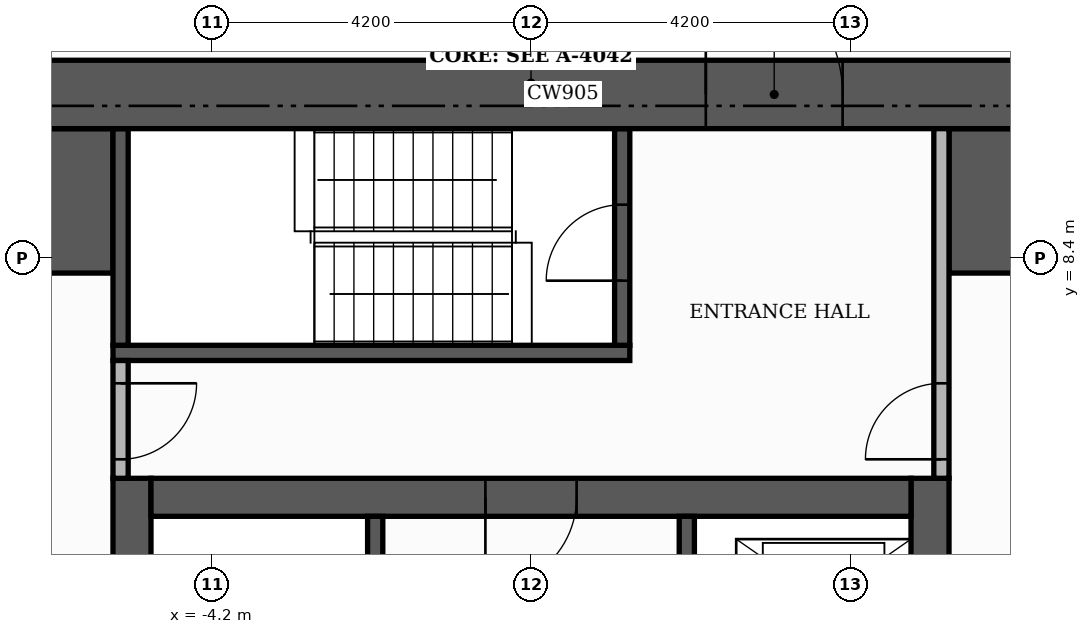
"""IFC4 building model, lengths in metres.
Left out: names, types, materials, properties, quantities, classifications, styles, units other than length and angle.
Written with IfcOpenShell. Run it as: python <this file> out.ifc"""

import sys

from ifc_helpers import new_model, si_unit, direction, frame, frame_2d, origin, place, context, subcontext, project, spatial, rectangle, extrude, element, fill, save


model = new_model("IFC4")
c1 = context("Model", 3, precision=1e-05, world=origin(), true_north=direction((0.0, 1.0)))
c2 = subcontext(c1, "Body", "Model", "MODEL_VIEW")
j1 = project(units=[si_unit("LENGTHUNIT", "METRE"), si_unit("PLANEANGLEUNIT", "RADIAN")], contexts=[c1])
p1 = place(None, origin())
s1 = spatial("IfcSite", under=j1, at=p1, CompositionType="ELEMENT")
p2 = place(p1, origin())
s2 = spatial("IfcBuilding", under=s1, at=p2, CompositionType="ELEMENT")
p3 = place(p2, frame((0.0, 0.0, 256.2)))
s3 = spatial("IfcBuildingStorey", under=s2, at=p3, CompositionType="ELEMENT", Elevation=256.2)
for number, where, z_axis, x_axis in (
    (1, (-5.25, -5.0, 0.0), (0.0, 0.0, 1.0), (0.0, 1.0, 0.0)),
    (2, (5.25, -5.0, 0.0), (0.0, 0.0, 1.0), (0.0, 1.0, 0.0)),
):
    element("IfcWall", number, at=place(p3, frame(where, z_axis=z_axis, x_axis=x_axis)), inside=s3, PredefinedType="SHEAR", context=c2, shape_type="SweptSolid", body=[
        extrude(rectangle(XDim=10.5, YDim=0.5, at=frame_2d((5.25, 0.0))), origin(), (0.0, 0.0, 1.0), 3.48),
    ])
p4 = place(p3, frame((-5.0, 5.25, 0.0), z_axis=(0.0, 0.0, 1.0), x_axis=(1.0, 0.0, 0.0)))
e3 = element("IfcWall", 3, at=p4, inside=s3, PredefinedType="SHEAR", context=c2, shape_type="SweptSolid", body=[
    extrude(rectangle(XDim=10.0, YDim=0.5, at=frame_2d((5.0, 0.0))), origin(), (0.0, 0.0, 1.0), 3.48),
])
p5 = place(p4, frame((4.4, 0.0, 0.0)))
e4 = element("IfcOpeningElement", 4, at=p5, cuts=e3, PredefinedType="OPENING", context=c2, shape_type="SweptSolid", body=[
    extrude(rectangle(XDim=1.2, YDim=2.1, at=frame_2d((0.6, 1.05))), frame((0.0, 0.26, 0.0), z_axis=(0.0, -1.0, 0.0), x_axis=(1.0, 0.0, 0.0)), (0.0, 0.0, 1.0), 0.52),
])
for number, where, z_axis, x_axis in (
    (5, (-10.1, 9.15, 0.0), (0.0, 0.0, 1.0), (1.0, 0.0, 0.0)),
    (6, (5.5, 9.15, 0.0), (0.0, 0.0, 1.0), (1.0, 0.0, 0.0)),
):
    element("IfcWall", number, at=place(p3, frame(where, z_axis=z_axis, x_axis=x_axis)), inside=s3, PredefinedType="SHEAR", context=c2, shape_type="SweptSolid", body=[
        extrude(rectangle(XDim=4.6, YDim=1.9, at=frame_2d((2.3, 0.0))), origin(), (0.0, 0.0, 1.0), 3.48),
    ])
p6 = place(p3, frame((-2.05, -1.4, 0.0), z_axis=(0.0, 0.0, 1.0), x_axis=(0.0, 1.0, 0.0)))
e7 = element("IfcWall", 7, at=p6, inside=s3, PredefinedType="SHEAR", context=c2, shape_type="SweptSolid", body=[
    extrude(rectangle(XDim=6.4, YDim=0.2, at=frame_2d((3.2, 0.0))), origin(), (0.0, 0.0, 1.0), 3.48),
])
p7 = place(p6, frame((0.15, 0.0, 0.0)))
e8 = element("IfcOpeningElement", 8, at=p7, cuts=e7, PredefinedType="OPENING", context=c2, shape_type="SweptSolid", body=[
    extrude(rectangle(XDim=1.0, YDim=2.1, at=frame_2d((0.5, 1.05))), frame((0.0, 0.11, 0.0), z_axis=(0.0, -1.0, 0.0), x_axis=(1.0, 0.0, 0.0)), (0.0, 0.0, 1.0), 0.22),
])
p8 = place(p3, frame((-5.5, 7.15, 0.0), z_axis=(0.0, 0.0, 1.0), x_axis=(1.0, 0.0, 0.0)))
e9 = element("IfcWall", 9, at=p8, inside=s3, PredefinedType="SHEAR", context=c2, shape_type="SweptSolid", body=[
    extrude(rectangle(XDim=6.8, YDim=0.2, at=frame_2d((3.4, 0.0))), origin(), (0.0, 0.0, 1.0), 3.48),
])
p9 = place(p3, frame((-5.4, 7.25, 0.0), z_axis=(0.0, 0.0, 1.0), x_axis=(0.0, 1.0, 0.0)))
e10 = element("IfcWall", 10, at=p9, inside=s3, PredefinedType="SHEAR", context=c2, shape_type="SweptSolid", body=[
    extrude(rectangle(XDim=2.85, YDim=0.2, at=frame_2d((1.425, 0.0))), origin(), (0.0, 0.0, 1.0), 3.48),
])
p10 = place(p3, frame((1.2, 7.25, 0.0), z_axis=(0.0, 0.0, 1.0), x_axis=(0.0, 1.0, 0.0)))
e11 = element("IfcWall", 11, at=p10, inside=s3, PredefinedType="SHEAR", context=c2, shape_type="SweptSolid", body=[
    extrude(rectangle(XDim=2.85, YDim=0.2, at=frame_2d((1.425, 0.0))), origin(), (0.0, 0.0, 1.0), 3.48),
])
p11 = place(p10, frame((0.85, 0.0, 0.0)))
e12 = element("IfcOpeningElement", 12, at=p11, cuts=e11, PredefinedType="OPENING", context=c2, shape_type="SweptSolid", body=[
    extrude(rectangle(XDim=1.0, YDim=2.1, at=frame_2d((0.5, 1.05))), frame((0.0, 0.11, 0.0), z_axis=(0.0, -1.0, 0.0), x_axis=(1.0, 0.0, 0.0)), (0.0, 0.0, 1.0), 0.22),
])
p12 = place(p3, frame((2.05, 1.6, 0.0), z_axis=(0.0, 0.0, 1.0), x_axis=(0.0, 1.0, 0.0)))
e13 = element("IfcWall", 13, at=p12, inside=s3, PredefinedType="SHEAR", context=c2, shape_type="SweptSolid", body=[
    extrude(rectangle(XDim=3.4, YDim=0.2, at=frame_2d((1.7, 0.0))), origin(), (0.0, 0.0, 1.0), 3.48),
])
p13 = place(p12, frame((1.75, 0.0, 0.0)))
e14 = element("IfcOpeningElement", 14, at=p13, cuts=e13, PredefinedType="OPENING", context=c2, shape_type="SweptSolid", body=[
    extrude(rectangle(XDim=1.1, YDim=2.1, at=frame_2d((0.55, 1.05))), frame((0.0, 0.11, 0.0), z_axis=(0.0, -1.0, 0.0), x_axis=(1.0, 0.0, 0.0)), (0.0, 0.0, 1.0), 0.22),
])
p14 = place(p12, frame((0.15, 0.0, 0.0)))
e15 = element("IfcOpeningElement", 15, at=p14, cuts=e13, PredefinedType="OPENING", context=c2, shape_type="SweptSolid", body=[
    extrude(rectangle(XDim=0.8, YDim=2.1, at=frame_2d((0.4, 1.05))), frame((0.0, 0.11, 0.0), z_axis=(0.0, -1.0, 0.0), x_axis=(1.0, 0.0, 0.0)), (0.0, 0.0, 1.0), 0.22),
])
p15 = place(p3, frame((-11.0, 10.55, 0.0), z_axis=(0.0, 0.0, 1.0), x_axis=(1.0, 0.0, 0.0)))
e16 = element("IfcWall", 16, at=p15, inside=s3, PredefinedType="SHEAR", context=c2, shape_type="SweptSolid", body=[
    extrude(rectangle(XDim=22.0, YDim=0.9, at=frame_2d((11.0, 0.0))), origin(), (0.0, 0.0, 1.0), 3.48),
])
p16 = place(p15, frame((13.3, 0.0, 0.0)))
e17 = element("IfcOpeningElement", 17, at=p16, cuts=e16, PredefinedType="OPENING", context=c2, shape_type="SweptSolid", body=[
    extrude(rectangle(XDim=1.8, YDim=2.2, at=frame_2d((0.9, 1.1))), frame((0.0, 0.46, 0.0), z_axis=(0.0, -1.0, 0.0), x_axis=(1.0, 0.0, 0.0)), (0.0, 0.0, 1.0), 0.92),
])
p17 = place(p3, frame((-5.4, 5.5, 0.0), z_axis=(0.0, 0.0, 1.0), x_axis=(0.0, 1.0, 0.0)))
e18 = element("IfcWall", 18, at=p17, inside=s3, PredefinedType="PARTITIONING", context=c2, shape_type="SweptSolid", body=[
    extrude(rectangle(XDim=1.55, YDim=0.2, at=frame_2d((0.775, 0.0))), origin(), (0.0, 0.0, 1.0), 3.48),
])
p18 = place(p17, frame((0.25, 0.0, 0.0)))
e19 = element("IfcOpeningElement", 19, at=p18, cuts=e18, PredefinedType="OPENING", context=c2, shape_type="SweptSolid", body=[
    extrude(rectangle(XDim=1.0, YDim=2.1, at=frame_2d((0.5, 1.05))), frame((0.0, 0.11, 0.0), z_axis=(0.0, -1.0, 0.0), x_axis=(1.0, 0.0, 0.0)), (0.0, 0.0, 1.0), 0.22),
])
p19 = place(p3, frame((5.4, 5.5, 0.0), z_axis=(0.0, 0.0, 1.0), x_axis=(0.0, 1.0, 0.0)))
e20 = element("IfcWall", 20, at=p19, inside=s3, PredefinedType="PARTITIONING", context=c2, shape_type="SweptSolid", body=[
    extrude(rectangle(XDim=4.6, YDim=0.2, at=frame_2d((2.3, 0.0))), origin(), (0.0, 0.0, 1.0), 3.48),
])
p20 = place(p19, frame((0.25, 0.0, 0.0)))
e21 = element("IfcOpeningElement", 21, at=p20, cuts=e20, PredefinedType="OPENING", context=c2, shape_type="SweptSolid", body=[
    extrude(rectangle(XDim=1.0, YDim=2.1, at=frame_2d((0.5, 1.05))), frame((0.0, 0.11, 0.0), z_axis=(0.0, -1.0, 0.0), x_axis=(1.0, 0.0, 0.0)), (0.0, 0.0, 1.0), 0.22),
])
p21 = place(p5, frame((1.2, 0.0, 0.0), z_axis=(0.0, 0.0, 1.0), x_axis=(-1.0, 0.0, 0.0)))
e22 = element("IfcDoor", 22, at=p21, inside=s3, OperationType="SINGLE_SWING_LEFT", PredefinedType="DOOR", context=c2, shape_type="SweptSolid", body=[
    extrude(rectangle(XDim=1.2, YDim=2.1, at=frame_2d((0.6, 1.05))), frame((0.0, 0.025, 0.0), z_axis=(0.0, -1.0, 0.0), x_axis=(1.0, 0.0, 0.0)), (0.0, 0.0, 1.0), 0.05),
])
fill(e4, e22)
p22 = place(p11, origin())
e23 = element("IfcDoor", 23, at=p22, inside=s3, OperationType="SINGLE_SWING_LEFT", PredefinedType="DOOR", context=c2, shape_type="SweptSolid", body=[
    extrude(rectangle(XDim=1.0, YDim=2.1, at=frame_2d((0.5, 1.05))), frame((0.0, 0.025, 0.0), z_axis=(0.0, -1.0, 0.0), x_axis=(1.0, 0.0, 0.0)), (0.0, 0.0, 1.0), 0.05),
])
fill(e12, e23)
p23 = place(p18, frame((1.0, 0.0, 0.0), z_axis=(0.0, 0.0, 1.0), x_axis=(-1.0, 0.0, 0.0)))
e24 = element("IfcDoor", 24, at=p23, inside=s3, OperationType="SINGLE_SWING_RIGHT", PredefinedType="DOOR", context=c2, shape_type="SweptSolid", body=[
    extrude(rectangle(XDim=1.0, YDim=2.1, at=frame_2d((0.5, 1.05))), frame((0.0, 0.025, 0.0), z_axis=(0.0, -1.0, 0.0), x_axis=(1.0, 0.0, 0.0)), (0.0, 0.0, 1.0), 0.05),
])
fill(e19, e24)
p24 = place(p20, origin())
e25 = element("IfcDoor", 25, at=p24, inside=s3, OperationType="SINGLE_SWING_LEFT", PredefinedType="DOOR", context=c2, shape_type="SweptSolid", body=[
    extrude(rectangle(XDim=1.0, YDim=2.1, at=frame_2d((0.5, 1.05))), frame((0.0, 0.025, 0.0), z_axis=(0.0, -1.0, 0.0), x_axis=(1.0, 0.0, 0.0)), (0.0, 0.0, 1.0), 0.05),
])
fill(e21, e25)
p25 = place(p16, origin())
e26 = element("IfcDoor", 26, at=p25, inside=s3, OperationType="DOUBLE_DOOR_SINGLE_SWING", PredefinedType="DOOR", context=c2, shape_type="SweptSolid", body=[
    extrude(rectangle(XDim=1.8, YDim=2.2, at=frame_2d((0.9, 1.1))), frame((0.0, 0.025, 0.0), z_axis=(0.0, -1.0, 0.0), x_axis=(1.0, 0.0, 0.0)), (0.0, 0.0, 1.0), 0.05),
])
fill(e17, e26)
save(model, sys.argv[1])
